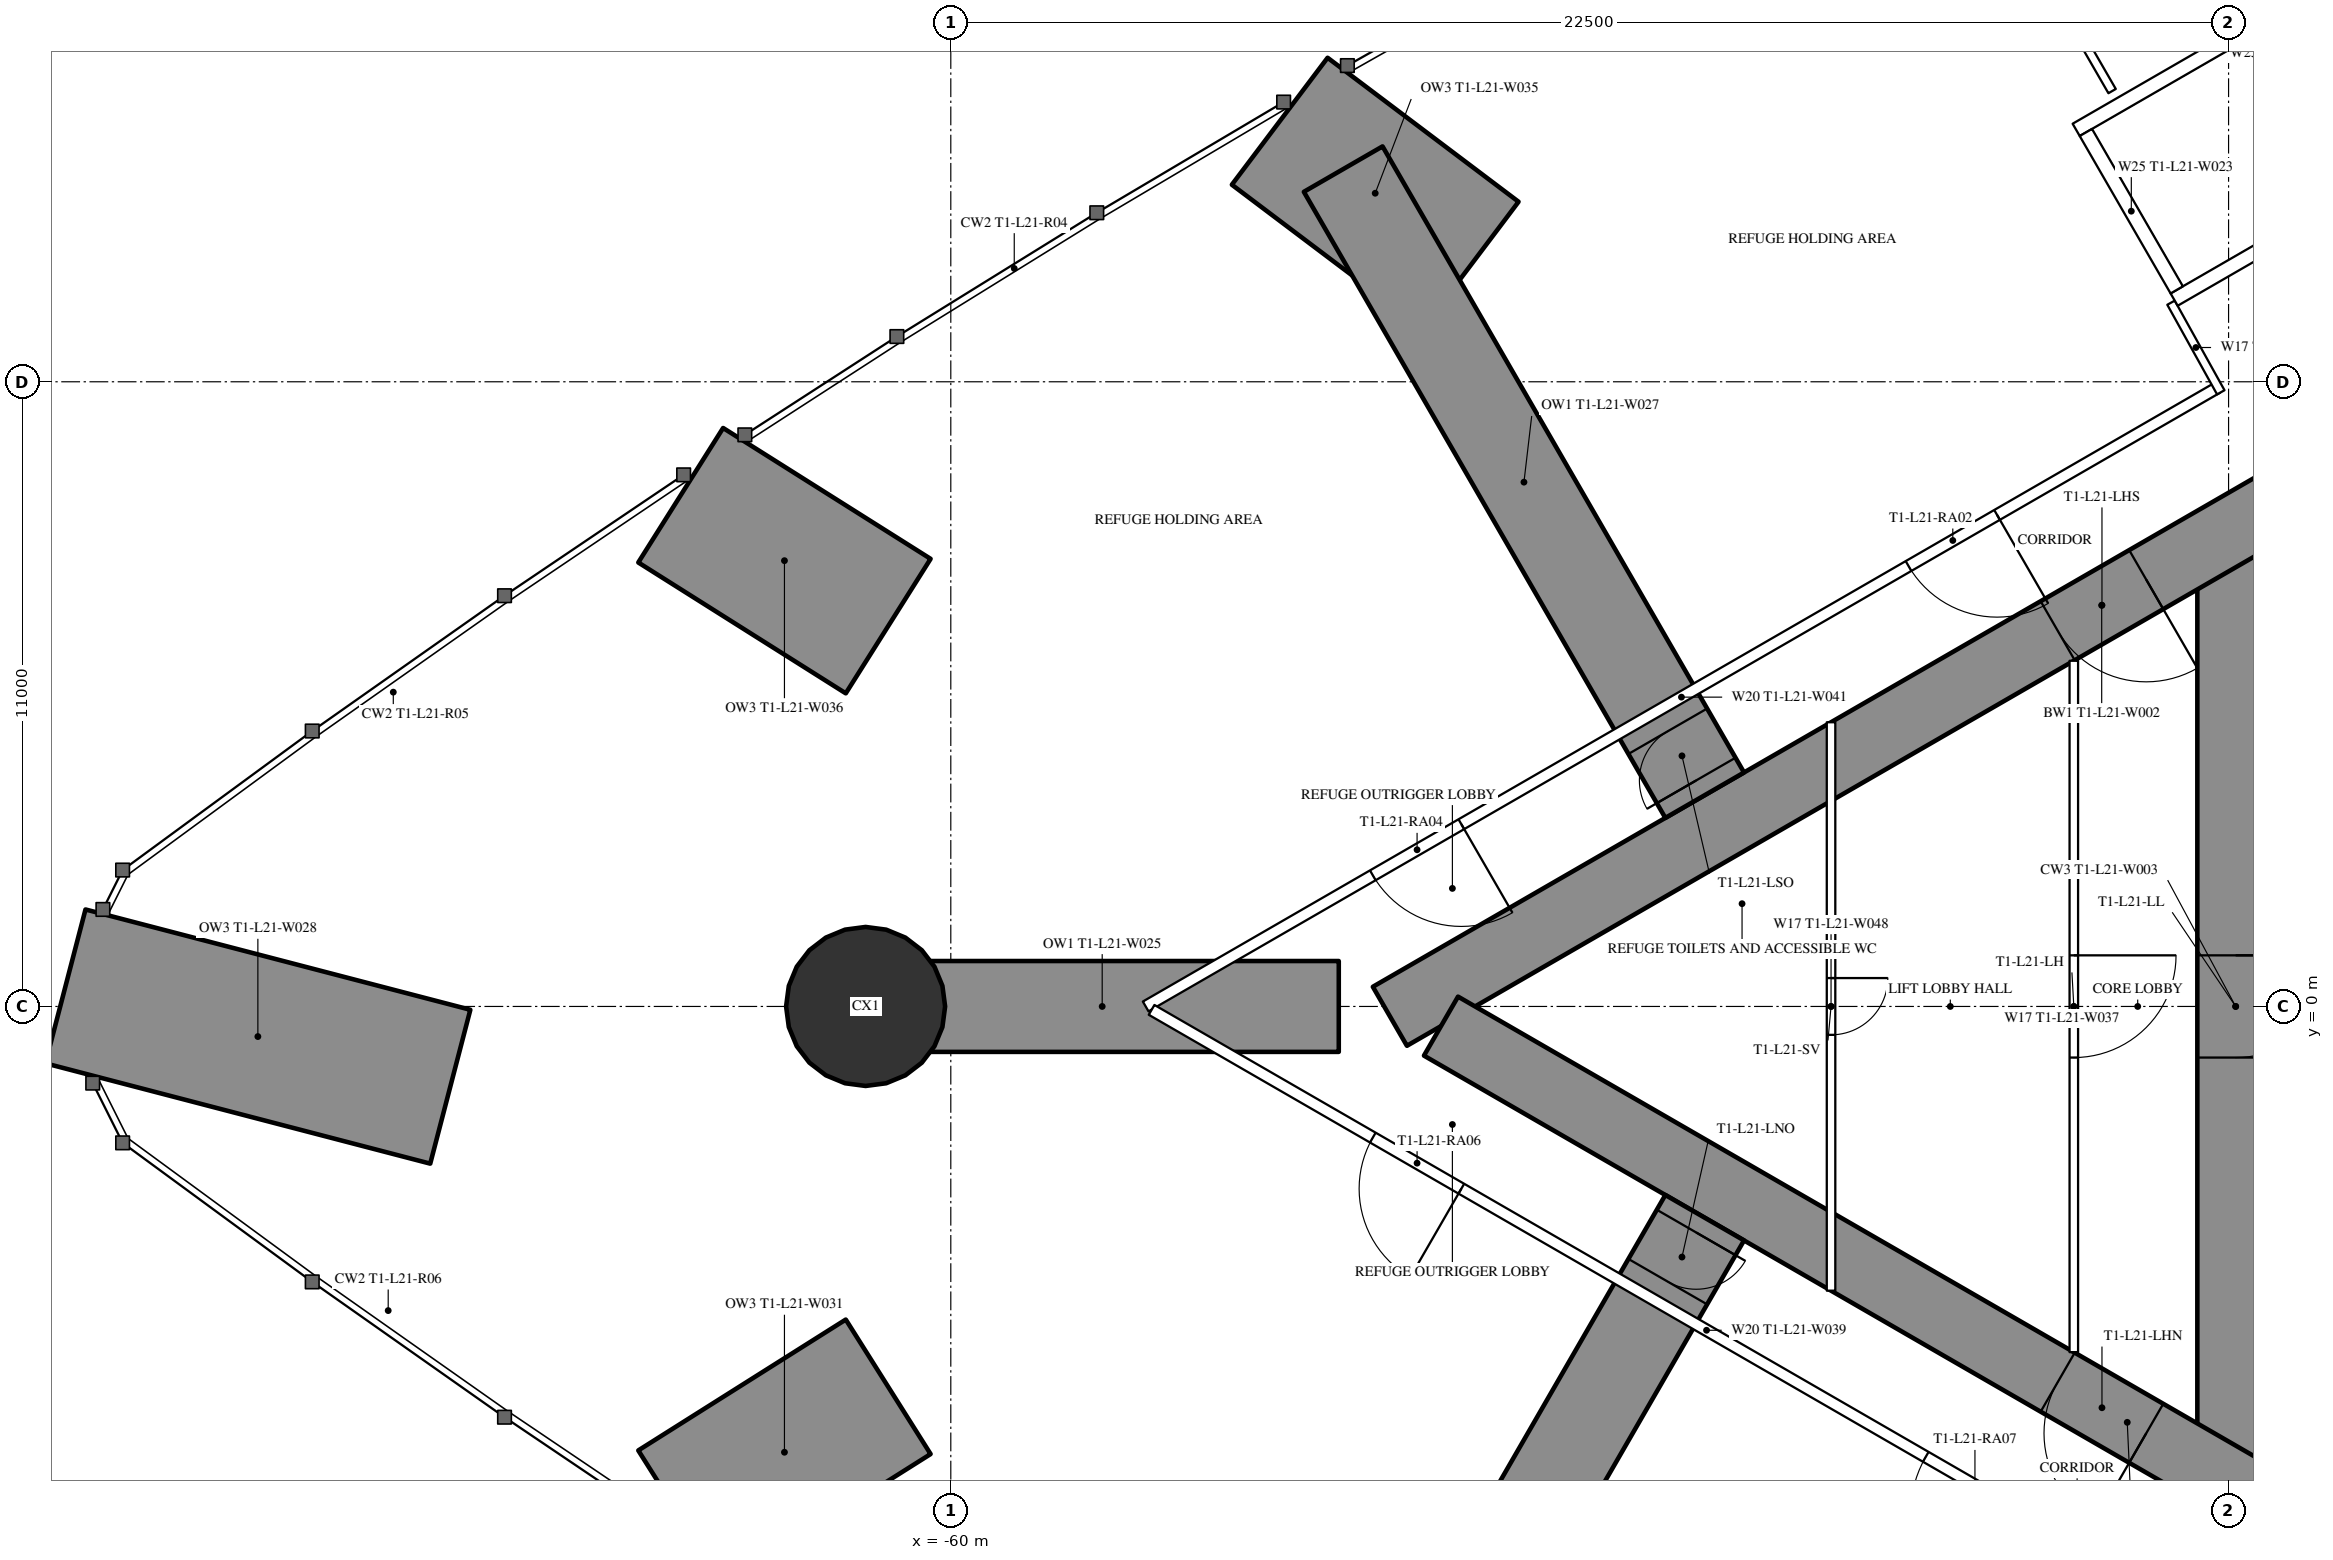
"""IFC4 building model, lengths in metres.
Left out: names, types, materials, properties, quantities, classifications, styles, units other than length and angle.
Written with IfcOpenShell. Run it as: python <this file> out.ifc"""

import sys

from ifc_helpers import new_model, si_unit, direction, frame, frame_2d, origin, origin_2d, place, context, subcontext, project, spatial, rectangle, hollow_circle, extrude, element, fill, save


model = new_model("IFC4")
c1 = context("Model", 3, precision=1e-05, world=origin(), true_north=direction((0.0, 1.0)))
c2 = subcontext(c1, "Body", "Model", "MODEL_VIEW")
j1 = project(units=[si_unit("LENGTHUNIT", "METRE"), si_unit("PLANEANGLEUNIT", "RADIAN")], contexts=[c1])
p1 = place(None, origin())
s1 = spatial("IfcSite", under=j1, at=p1, CompositionType="ELEMENT")
p2 = place(p1, origin())
s2 = spatial("IfcBuilding", under=s1, at=p2, CompositionType="ELEMENT")
p3 = place(p2, frame((0.0, 0.0, 81.0)))
s3 = spatial("IfcBuildingStorey", under=s2, at=p3, CompositionType="ELEMENT", Elevation=81.0)
p4 = place(p3, frame((-75.59, 0.353, 0.0), z_axis=(0.0, 0.0, 1.0), x_axis=(0.967676481034, -0.252194821623, 0.0)))
e1 = element("IfcWall", 1, at=p4, inside=s3, PredefinedType="SHEAR", context=c2, shape_type="SweptSolid", body=[
    extrude(rectangle(XDim=7.003, YDim=2.8, at=frame_2d((3.501, 0.0))), origin(), (0.0, 0.0, 1.0), 6.0),
])
p5 = place(p3, frame((-64.756, -9.002, 0.0), z_axis=(0.0, 0.0, 1.0), x_axis=(0.845851319887, 0.533418732934, 0.0)))
e2 = element("IfcWall", 2, at=p5, inside=s3, PredefinedType="SHEAR", context=c2, shape_type="SweptSolid", body=[
    extrude(rectangle(XDim=4.32, YDim=2.8, at=frame_2d((2.16, 0.0))), origin(), (0.0, 0.0, 1.0), 6.0),
])
p6 = place(p3, frame((-54.208, 15.588, 0.0), z_axis=(0.0, 0.0, 1.0), x_axis=(0.798432065831, -0.602084907843, 0.0)))
e3 = element("IfcWall", 3, at=p6, inside=s3, PredefinedType="SHEAR", context=c2, shape_type="SweptSolid", body=[
    extrude(rectangle(XDim=4.211, YDim=2.8, at=frame_2d((2.106, 0.0))), origin(), (0.0, 0.0, 1.0), 6.0),
])
p7 = place(p3, frame((-64.756, 9.002, 0.0), z_axis=(0.0, 0.0, 1.0), x_axis=(0.845851319887, -0.533418732934, 0.0)))
e4 = element("IfcWall", 4, at=p7, inside=s3, PredefinedType="SHEAR", context=c2, shape_type="SweptSolid", body=[
    extrude(rectangle(XDim=4.32, YDim=2.8, at=frame_2d((2.16, 0.0))), origin(), (0.0, 0.0, 1.0), 6.0),
])
p8 = place(p3, frame((-61.5, 0.0, 0.0), z_axis=(0.0, 0.0, 1.0), x_axis=(1.0, 0.0, 0.0)))
e5 = element("IfcColumn", 5, at=p8, inside=s3, PredefinedType="COLUMN", context=c2, shape_type="SweptSolid", body=[
    extrude(hollow_circle(Radius=1.4, WallThickness=0.1, at=origin_2d()), origin(), (0.0, 0.0, 1.0), 6.0),
])
p9 = place(p3, frame((-37.375, 8.6, 0.0), z_axis=(0.0, 0.0, 1.0), x_axis=(0.0, -1.0, 0.0)))
e6 = element("IfcWall", 6, at=p9, inside=s3, PredefinedType="SHEAR", context=c2, shape_type="SweptSolid", body=[
    extrude(rectangle(XDim=17.2, YDim=1.35, at=frame_2d((8.6, 0.0))), origin(), (0.0, 0.0, 1.0), 6.0),
])
p10 = place(p9, frame((7.7, 0.0, 0.0)))
e7 = element("IfcOpeningElement", 7, at=p10, cuts=e6, PredefinedType="OPENING", context=c2, shape_type="SweptSolid", body=[
    extrude(rectangle(XDim=1.8, YDim=2.2, at=frame_2d((0.9, 1.1))), frame((0.0, 0.685, 0.0), z_axis=(0.0, -1.0, 0.0), x_axis=(1.0, 0.0, 0.0)), (0.0, 0.0, 1.0), 1.37),
])
p11 = place(p3, frame((-27.2, 14.3, 0.0), z_axis=(0.0, 0.0, 1.0), x_axis=(-0.866026593062, -0.499997940104, 0.0)))
e8 = element("IfcWall", 8, at=p11, inside=s3, PredefinedType="SHEAR", context=c2, shape_type="SweptSolid", body=[
    extrude(rectangle(XDim=28.946, YDim=1.2, at=frame_2d((14.473, 0.0))), origin(), (0.0, 0.0, 1.0), 6.0),
])
p12 = place(p11, frame((4.6, 0.0, 0.0)))
e9 = element("IfcOpeningElement", 9, at=p12, cuts=e8, PredefinedType="OPENING", context=c2, shape_type="SweptSolid", body=[
    extrude(rectangle(XDim=1.0, YDim=2.2, at=frame_2d((0.5, 1.1))), frame((0.0, 0.61, 0.0), z_axis=(0.0, -1.0, 0.0), x_axis=(1.0, 0.0, 0.0)), (0.0, 0.0, 1.0), 1.22),
])
p13 = place(p11, frame((13.568, 0.0, 0.0)))
e10 = element("IfcOpeningElement", 10, at=p13, cuts=e8, PredefinedType="OPENING", context=c2, shape_type="SweptSolid", body=[
    extrude(rectangle(XDim=1.8, YDim=2.2, at=frame_2d((0.9, 1.1))), frame((0.0, 0.61, 0.0), z_axis=(0.0, -1.0, 0.0), x_axis=(1.0, 0.0, 0.0)), (0.0, 0.0, 1.0), 1.22),
])
p14 = place(p3, frame((-27.2, -14.3, 0.0), z_axis=(0.0, 0.0, 1.0), x_axis=(-0.866024021859, 0.500002393557, 0.0)))
e11 = element("IfcWall", 11, at=p14, inside=s3, PredefinedType="SHEAR", context=c2, shape_type="SweptSolid", body=[
    extrude(rectangle(XDim=27.907, YDim=1.2, at=frame_2d((13.954, 0.0))), origin(), (0.0, 0.0, 1.0), 6.0),
])
p15 = place(p14, frame((4.6, 0.0, 0.0)))
e12 = element("IfcOpeningElement", 12, at=p15, cuts=e11, PredefinedType="OPENING", context=c2, shape_type="SweptSolid", body=[
    extrude(rectangle(XDim=1.0, YDim=2.2, at=frame_2d((0.5, 1.1))), frame((0.0, 0.61, 0.0), z_axis=(0.0, -1.0, 0.0), x_axis=(1.0, 0.0, 0.0)), (0.0, 0.0, 1.0), 1.22),
])
p16 = place(p14, frame((13.568, 0.0, 0.0)))
e13 = element("IfcOpeningElement", 13, at=p16, cuts=e11, PredefinedType="OPENING", context=c2, shape_type="SweptSolid", body=[
    extrude(rectangle(XDim=1.8, YDim=2.2, at=frame_2d((0.9, 1.1))), frame((0.0, 0.61, 0.0), z_axis=(0.0, -1.0, 0.0), x_axis=(1.0, 0.0, 0.0)), (0.0, 0.0, 1.0), 1.22),
])
p17 = place(p3, frame((-46.725, 3.72, 0.0), z_axis=(0.0, 0.0, 1.0), x_axis=(-0.500000237956, 0.866025266401, 0.0)))
e14 = element("IfcWall", 14, at=p17, inside=s3, PredefinedType="SHEAR", context=c2, shape_type="SweptSolid", body=[
    extrude(rectangle(XDim=12.73, YDim=1.6, at=frame_2d((6.365, 0.0))), origin(), (0.0, 0.0, 1.0), 6.0),
])
p18 = place(p17, frame((0.3, 0.0, 0.0)))
e15 = element("IfcOpeningElement", 15, at=p18, cuts=e14, PredefinedType="OPENING", context=c2, shape_type="SweptSolid", body=[
    extrude(rectangle(XDim=1.0, YDim=2.2, at=frame_2d((0.5, 1.1))), frame((0.0, 0.81, 0.0), z_axis=(0.0, -1.0, 0.0), x_axis=(1.0, 0.0, 0.0)), (0.0, 0.0, 1.0), 1.62),
])
p19 = place(p3, frame((-53.168, 0.0, 0.0), z_axis=(0.0, 0.0, 1.0), x_axis=(-1.0, 0.0, 0.0)))
e16 = element("IfcWall", 16, at=p19, inside=s3, PredefinedType="SHEAR", context=c2, shape_type="SweptSolid", body=[
    extrude(rectangle(XDim=8.332, YDim=1.6, at=frame_2d((4.166, 0.0))), origin(), (0.0, 0.0, 1.0), 6.0),
])
p20 = place(p3, frame((-46.725, -3.72, 0.0), z_axis=(0.0, 0.0, 1.0), x_axis=(-0.500000237956, -0.866025266401, 0.0)))
e17 = element("IfcWall", 17, at=p20, inside=s3, PredefinedType="SHEAR", context=c2, shape_type="SweptSolid", body=[
    extrude(rectangle(XDim=12.73, YDim=1.6, at=frame_2d((6.365, 0.0))), origin(), (0.0, 0.0, 1.0), 6.0),
])
p21 = place(p20, frame((0.3, 0.0, 0.0)))
e18 = element("IfcOpeningElement", 18, at=p21, cuts=e17, PredefinedType="OPENING", context=c2, shape_type="SweptSolid", body=[
    extrude(rectangle(XDim=1.0, YDim=2.2, at=frame_2d((0.5, 1.1))), frame((0.0, 0.81, 0.0), z_axis=(0.0, -1.0, 0.0), x_axis=(1.0, 0.0, 0.0)), (0.0, 0.0, 1.0), 1.62),
])
p22 = place(p3, frame((-39.551, 16.119, 0.0), z_axis=(0.0, 0.0, 1.0), x_axis=(-0.500014214979, 0.866017196607, 0.0)))
e19 = element("IfcWall", 19, at=p22, inside=s3, PredefinedType="PARTITIONING", context=c2, shape_type="SweptSolid", body=[
    extrude(rectangle(XDim=3.815, YDim=0.15, at=frame_2d((1.907, 0.0))), origin(), (0.0, 0.0, 1.0), 5.75),
])
p23 = place(p3, frame((-37.7, 10.894, 0.0), z_axis=(0.0, 0.0, 1.0), x_axis=(-0.866027905338, -0.499995667157, 0.0)))
e20 = element("IfcWall", 20, at=p23, inside=s3, PredefinedType="PARTITIONING", context=c2, shape_type="SweptSolid", body=[
    extrude(rectangle(XDim=21.787, YDim=0.2, at=frame_2d((10.894, 0.0))), origin(), (0.0, 0.0, 1.0), 5.75),
])
p24 = place(p23, frame((15.369, 0.0, 0.0)))
e21 = element("IfcOpeningElement", 21, at=p24, cuts=e20, PredefinedType="OPENING", context=c2, shape_type="SweptSolid", body=[
    extrude(rectangle(XDim=1.8, YDim=2.2, at=frame_2d((0.9, 1.1))), frame((0.0, 0.11, 0.0), z_axis=(0.0, -1.0, 0.0), x_axis=(1.0, 0.0, 0.0)), (0.0, 0.0, 1.0), 0.22),
])
p25 = place(p23, frame((4.476, 0.0, 0.0)))
e22 = element("IfcOpeningElement", 22, at=p25, cuts=e20, PredefinedType="OPENING", context=c2, shape_type="SweptSolid", body=[
    extrude(rectangle(XDim=1.8, YDim=2.2, at=frame_2d((0.9, 1.1))), frame((0.0, 0.11, 0.0), z_axis=(0.0, -1.0, 0.0), x_axis=(1.0, 0.0, 0.0)), (0.0, 0.0, 1.0), 0.22),
])
p26 = place(p3, frame((-36.92, -11.344, 0.0), z_axis=(0.0, 0.0, 1.0), x_axis=(-0.866028313256, 0.499994960614, 0.0)))
e23 = element("IfcWall", 23, at=p26, inside=s3, PredefinedType="PARTITIONING", context=c2, shape_type="SweptSolid", body=[
    extrude(rectangle(XDim=22.568, YDim=0.2, at=frame_2d((11.284, 0.0))), origin(), (0.0, 0.0, 1.0), 5.75),
])
p27 = place(p26, frame((16.27, 0.0, 0.0)))
e24 = element("IfcOpeningElement", 24, at=p27, cuts=e23, PredefinedType="OPENING", context=c2, shape_type="SweptSolid", body=[
    extrude(rectangle(XDim=1.8, YDim=2.2, at=frame_2d((0.9, 1.1))), frame((0.0, 0.11, 0.0), z_axis=(0.0, -1.0, 0.0), x_axis=(1.0, 0.0, 0.0)), (0.0, 0.0, 1.0), 0.22),
])
p28 = place(p26, frame((4.826, 0.0, 0.0)))
e25 = element("IfcOpeningElement", 25, at=p28, cuts=e23, PredefinedType="OPENING", context=c2, shape_type="SweptSolid", body=[
    extrude(rectangle(XDim=2.0, YDim=2.4, at=frame_2d((1.0, 1.2))), frame((0.0, 0.11, 0.0), z_axis=(0.0, -1.0, 0.0), x_axis=(1.0, 0.0, 0.0)), (0.0, 0.0, 1.0), 0.22),
])
p29 = place(p3, frame((-38.513, 12.392, 0.0), z_axis=(0.0, 0.0, 1.0), x_axis=(0.485585508183, -0.874189175317, 0.0)))
e26 = element("IfcWall", 26, at=p29, inside=s3, PredefinedType="PARTITIONING", context=c2, shape_type="SweptSolid", body=[
    extrude(rectangle(XDim=1.805, YDim=0.15, at=frame_2d((0.902, 0.0))), origin(), (0.0, 0.0, 1.0), 5.75),
])
p30 = place(p3, frame((-40.225, 6.087, 0.0), z_axis=(0.0, 0.0, 1.0), x_axis=(0.0, -1.0, 0.0)))
e27 = element("IfcWall", 27, at=p30, inside=s3, PredefinedType="PARTITIONING", context=c2, shape_type="SweptSolid", body=[
    extrude(rectangle(XDim=12.174, YDim=0.15, at=frame_2d((6.087, 0.0))), origin(), (0.0, 0.0, 1.0), 5.75),
])
p31 = place(p30, frame((5.187, 0.0, 0.0)))
e28 = element("IfcOpeningElement", 28, at=p31, cuts=e27, PredefinedType="OPENING", context=c2, shape_type="SweptSolid", body=[
    extrude(rectangle(XDim=1.8, YDim=2.2, at=frame_2d((0.9, 1.1))), frame((0.0, 0.085, 0.0), z_axis=(0.0, -1.0, 0.0), x_axis=(1.0, 0.0, 0.0)), (0.0, 0.0, 1.0), 0.17),
])
p32 = place(p3, frame((-44.5, 5.005, 0.0), z_axis=(0.0, 0.0, 1.0), x_axis=(0.0, -1.0, 0.0)))
e29 = element("IfcWall", 29, at=p32, inside=s3, PredefinedType="PARTITIONING", context=c2, shape_type="SweptSolid", body=[
    extrude(rectangle(XDim=10.009, YDim=0.15, at=frame_2d((5.005, 0.0))), origin(), (0.0, 0.0, 1.0), 4.45),
])
p33 = place(p32, frame((4.505, 0.0, 0.0)))
e30 = element("IfcOpeningElement", 30, at=p33, cuts=e29, PredefinedType="OPENING", context=c2, shape_type="SweptSolid", body=[
    extrude(rectangle(XDim=1.0, YDim=2.2, at=frame_2d((0.5, 1.1))), frame((0.0, 0.085, 0.0), z_axis=(0.0, -1.0, 0.0), x_axis=(1.0, 0.0, 0.0)), (0.0, 0.0, 1.0), 0.17),
])
for number, where, z_axis, x_axis in (
    (31, (-31.01, 16.747, 0.0), (0.0, 0.0, 1.0), (-0.866, -0.5, 0.0)),
    (32, (-32.736, 19.736, 0.0), (0.0, 0.0, 1.0), (-0.866, -0.5, 0.0)),
):
    element("IfcWall", number, at=place(p3, frame(where, z_axis=z_axis, x_axis=x_axis)), inside=s3, PredefinedType="PARTITIONING", context=c2, shape_type="SweptSolid", body=[
        extrude(rectangle(XDim=8.6, YDim=0.25, at=frame_2d((4.3, 0.0))), origin(), (0.0, 0.0, 1.0), 5.75),
    ])
p34 = place(p3, frame((-38.413, 12.618, 0.0), z_axis=(0.0, 0.0, 1.0), x_axis=(-0.499872130319, 0.866099216793, 0.0)))
e33 = element("IfcWall", 33, at=p34, inside=s3, PredefinedType="PARTITIONING", context=c2, shape_type="SweptSolid", body=[
    extrude(rectangle(XDim=3.2, YDim=0.25, at=frame_2d((1.6, 0.0))), origin(), (0.0, 0.0, 1.0), 5.75),
])
p35 = place(p18, origin())
e34 = element("IfcDoor", 34, at=p35, inside=s3, OperationType="SINGLE_SWING_LEFT", PredefinedType="DOOR", context=c2, shape_type="SweptSolid", body=[
    extrude(rectangle(XDim=1.0, YDim=2.2, at=frame_2d((0.5, 1.1))), frame((0.0, 0.025, 0.0), z_axis=(0.0, -1.0, 0.0), x_axis=(1.0, 0.0, 0.0)), (0.0, 0.0, 1.0), 0.05),
])
fill(e15, e34)
p36 = place(p21, origin())
e35 = element("IfcDoor", 35, at=p36, inside=s3, OperationType="SINGLE_SWING_LEFT", PredefinedType="DOOR", context=c2, shape_type="SweptSolid", body=[
    extrude(rectangle(XDim=1.0, YDim=2.2, at=frame_2d((0.5, 1.1))), frame((0.0, 0.025, 0.0), z_axis=(0.0, -1.0, 0.0), x_axis=(1.0, 0.0, 0.0)), (0.0, 0.0, 1.0), 0.05),
])
fill(e18, e35)
p37 = place(p24, origin())
e36 = element("IfcDoor", 36, at=p37, inside=s3, OperationType="DOUBLE_DOOR_SINGLE_SWING", PredefinedType="DOOR", context=c2, shape_type="SweptSolid", body=[
    extrude(rectangle(XDim=1.8, YDim=2.2, at=frame_2d((0.9, 1.1))), frame((0.0, 0.025, 0.0), z_axis=(0.0, -1.0, 0.0), x_axis=(1.0, 0.0, 0.0)), (0.0, 0.0, 1.0), 0.05),
])
fill(e21, e36)
p38 = place(p27, origin())
e37 = element("IfcDoor", 37, at=p38, inside=s3, OperationType="DOUBLE_DOOR_SINGLE_SWING", PredefinedType="DOOR", context=c2, shape_type="SweptSolid", body=[
    extrude(rectangle(XDim=1.8, YDim=2.2, at=frame_2d((0.9, 1.1))), frame((0.0, 0.025, 0.0), z_axis=(0.0, -1.0, 0.0), x_axis=(1.0, 0.0, 0.0)), (0.0, 0.0, 1.0), 0.05),
])
fill(e24, e37)
p39 = place(p28, origin())
e38 = element("IfcDoor", 38, at=p39, inside=s3, OperationType="DOUBLE_DOOR_SINGLE_SWING", PredefinedType="DOOR", context=c2, shape_type="SweptSolid", body=[
    extrude(rectangle(XDim=2.0, YDim=2.4, at=frame_2d((1.0, 1.2))), frame((0.0, 0.025, 0.0), z_axis=(0.0, -1.0, 0.0), x_axis=(1.0, 0.0, 0.0)), (0.0, 0.0, 1.0), 0.05),
])
fill(e25, e38)
p40 = place(p25, origin())
e39 = element("IfcDoor", 39, at=p40, inside=s3, OperationType="DOUBLE_DOOR_SINGLE_SWING", PredefinedType="DOOR", context=c2, shape_type="SweptSolid", body=[
    extrude(rectangle(XDim=1.8, YDim=2.2, at=frame_2d((0.9, 1.1))), frame((0.0, 0.025, 0.0), z_axis=(0.0, -1.0, 0.0), x_axis=(1.0, 0.0, 0.0)), (0.0, 0.0, 1.0), 0.05),
])
fill(e22, e39)
p41 = place(p31, origin())
e40 = element("IfcDoor", 40, at=p41, inside=s3, OperationType="DOUBLE_DOOR_SINGLE_SWING", PredefinedType="DOOR", context=c2, shape_type="SweptSolid", body=[
    extrude(rectangle(XDim=1.8, YDim=2.2, at=frame_2d((0.9, 1.1))), frame((0.0, 0.025, 0.0), z_axis=(0.0, -1.0, 0.0), x_axis=(1.0, 0.0, 0.0)), (0.0, 0.0, 1.0), 0.05),
])
fill(e28, e40)
p42 = place(p33, origin())
e41 = element("IfcDoor", 41, at=p42, inside=s3, OperationType="SINGLE_SWING_LEFT", PredefinedType="DOOR", context=c2, shape_type="SweptSolid", body=[
    extrude(rectangle(XDim=1.0, YDim=2.2, at=frame_2d((0.5, 1.1))), frame((0.0, 0.025, 0.0), z_axis=(0.0, -1.0, 0.0), x_axis=(1.0, 0.0, 0.0)), (0.0, 0.0, 1.0), 0.05),
])
fill(e30, e41)
p43 = place(p13, origin())
e42 = element("IfcDoor", 42, at=p43, inside=s3, OperationType="DOUBLE_DOOR_SINGLE_SWING", PredefinedType="DOOR", context=c2, shape_type="SweptSolid", body=[
    extrude(rectangle(XDim=1.8, YDim=2.2, at=frame_2d((0.9, 1.1))), frame((0.0, 0.025, 0.0), z_axis=(0.0, -1.0, 0.0), x_axis=(1.0, 0.0, 0.0)), (0.0, 0.0, 1.0), 0.05),
])
fill(e10, e42)
p44 = place(p16, origin())
e43 = element("IfcDoor", 43, at=p44, inside=s3, OperationType="DOUBLE_DOOR_SINGLE_SWING", PredefinedType="DOOR", context=c2, shape_type="SweptSolid", body=[
    extrude(rectangle(XDim=1.8, YDim=2.2, at=frame_2d((0.9, 1.1))), frame((0.0, 0.025, 0.0), z_axis=(0.0, -1.0, 0.0), x_axis=(1.0, 0.0, 0.0)), (0.0, 0.0, 1.0), 0.05),
])
fill(e13, e43)
p45 = place(p10, origin())
e44 = element("IfcDoor", 44, at=p45, inside=s3, OperationType="DOUBLE_DOOR_SINGLE_SWING", PredefinedType="DOOR", context=c2, shape_type="SweptSolid", body=[
    extrude(rectangle(XDim=1.8, YDim=2.2, at=frame_2d((0.9, 1.1))), frame((0.0, 0.025, 0.0), z_axis=(0.0, -1.0, 0.0), x_axis=(1.0, 0.0, 0.0)), (0.0, 0.0, 1.0), 0.05),
])
fill(e7, e44)
save(model, sys.argv[1])
